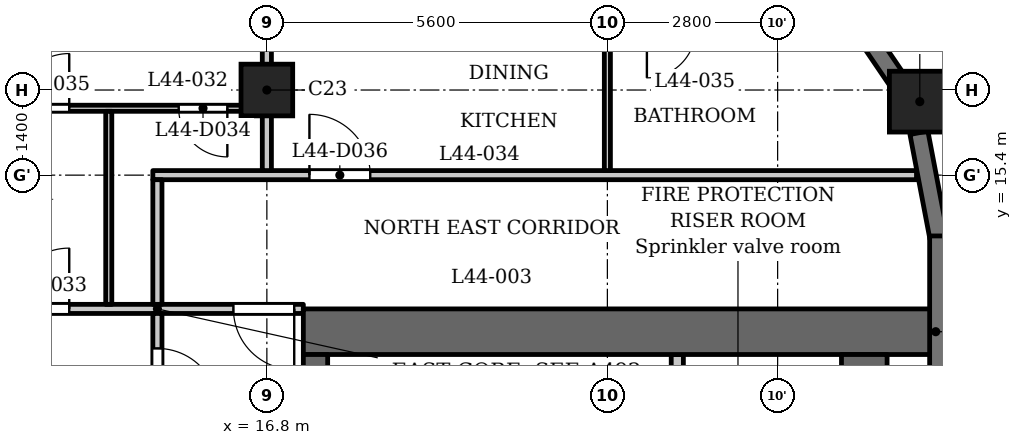
"""IFC4 building model, lengths in metres.
Left out: names, types, materials, properties, quantities, classifications, styles, units other than length and angle.
Written with IfcOpenShell. Run it as: python <this file> out.ifc"""

import sys

from ifc_helpers import new_model, si_unit, direction, frame, frame_2d, origin, origin_2d, place, context, subcontext, project, spatial, rectangle, extrude, element, fill, save


model = new_model("IFC4")
c1 = context("Model", 3, precision=1e-05, world=origin(), true_north=direction((0.0, 1.0)))
c2 = subcontext(c1, "Body", "Model", "MODEL_VIEW")
j1 = project(units=[si_unit("LENGTHUNIT", "METRE"), si_unit("PLANEANGLEUNIT", "RADIAN")], contexts=[c1])
p1 = place(None, origin())
s1 = spatial("IfcSite", under=j1, at=p1, CompositionType="ELEMENT")
p2 = place(p1, origin())
s2 = spatial("IfcBuilding", under=s1, at=p2, CompositionType="ELEMENT")
p3 = place(p2, frame((0.0, 0.0, 171.1)))
s3 = spatial("IfcBuildingStorey", under=s2, at=p3, CompositionType="ELEMENT", Elevation=171.1)
p4 = place(p3, frame((27.538, 16.609, 0.0), z_axis=(0.0, 0.0, 1.0), x_axis=(1.0, 0.0, 0.0)))
e1 = element("IfcColumn", 1, at=p4, inside=s3, PredefinedType="COLUMN", context=c2, shape_type="SweptSolid", body=[
    extrude(rectangle(XDim=1.0, YDim=1.0, at=origin_2d()), origin(), (0.0, 0.0, 1.0), 3.5),
])
p5 = place(p3, frame((16.8, 16.8, 0.0), z_axis=(0.0, 0.0, 1.0), x_axis=(1.0, 0.0, 0.0)))
e2 = element("IfcColumn", 2, at=p5, inside=s3, PredefinedType="COLUMN", context=c2, shape_type="SweptSolid", body=[
    extrude(rectangle(XDim=0.85, YDim=0.85, at=origin_2d()), origin(), (0.0, 0.0, 1.0), 3.5),
])
p6 = place(p3, frame((27.85, 11.7, 0.0), z_axis=(0.0, 0.0, 1.0), x_axis=(0.0, 1.0, 0.0)))
e3 = element("IfcWall", 3, at=p6, inside=s3, PredefinedType="SOLIDWALL", context=c2, shape_type="SweptSolid", body=[
    extrude(rectangle(XDim=2.7, YDim=0.3, at=frame_2d((1.35, 0.0))), origin(), (0.0, 0.0, 1.0), 2.45),
])
for number, where, z_axis, x_axis in (
    (4, (27.853, 14.372, 0.0), (0.0, 0.0, 1.0), (-0.187, 0.982, 0.0)),
    (5, (27.166, 16.96, 0.0), (0.0, 0.0, 1.0), (-0.562, 0.827, 0.0)),
):
    element("IfcWall", number, at=place(p3, frame(where, z_axis=z_axis, x_axis=x_axis)), inside=s3, PredefinedType="SOLIDWALL", context=c2, shape_type="SweptSolid", body=[
        extrude(rectangle(XDim=1.756, YDim=0.3, at=frame_2d((0.878, 0.0))), origin(), (0.0, 0.0, 1.0), 2.45),
    ])
p7 = place(p3, frame((17.4, 12.825, 0.0), z_axis=(0.0, 0.0, 1.0), x_axis=(1.0, 0.0, 0.0)))
e6 = element("IfcWall", 6, at=p7, inside=s3, PredefinedType="SHEAR", context=c2, shape_type="SweptSolid", body=[
    extrude(rectangle(XDim=10.4, YDim=0.75, at=frame_2d((5.2, 0.0))), origin(), (0.0, 0.0, 1.0), 3.2),
])
p8 = place(p3, frame((17.6, -12.45, 0.0), z_axis=(0.0, 0.0, 1.0), x_axis=(0.0, 1.0, 0.0)))
e7 = element("IfcWall", 7, at=p8, inside=s3, PredefinedType="SHEAR", context=c2, shape_type="SweptSolid", body=[
    extrude(rectangle(XDim=24.9, YDim=0.4, at=frame_2d((12.45, 0.0))), origin(), (0.0, 0.0, 1.0), 3.2),
])
p9 = place(p8, frame((8.65, 0.0, 0.0)))
e8 = element("IfcOpeningElement", 8, at=p9, cuts=e7, PredefinedType="OPENING", context=c2, shape_type="SweptSolid", body=[
    extrude(rectangle(XDim=0.9, YDim=2.1, at=frame_2d((0.45, 1.05))), frame((0.0, 0.21, 0.0), z_axis=(0.0, -1.0, 0.0), x_axis=(1.0, 0.0, 0.0)), (0.0, 0.0, 1.0), 0.42),
])
p10 = place(p8, frame((15.6, 0.0, 0.0)))
e9 = element("IfcOpeningElement", 9, at=p10, cuts=e7, PredefinedType="OPENING", context=c2, shape_type="SweptSolid", body=[
    extrude(rectangle(XDim=1.1, YDim=2.1, at=frame_2d((0.55, 1.05))), frame((0.0, 0.21, 0.0), z_axis=(0.0, -1.0, 0.0), x_axis=(1.0, 0.0, 0.0)), (0.0, 0.0, 1.0), 0.42),
])
p11 = place(p8, frame((18.0, 0.0, 0.0)))
e10 = element("IfcOpeningElement", 10, at=p11, cuts=e7, PredefinedType="OPENING", context=c2, shape_type="SweptSolid", body=[
    extrude(rectangle(XDim=1.1, YDim=2.1, at=frame_2d((0.55, 1.05))), frame((0.0, 0.21, 0.0), z_axis=(0.0, -1.0, 0.0), x_axis=(1.0, 0.0, 0.0)), (0.0, 0.0, 1.0), 0.42),
])
p12 = place(p8, frame((23.025, 0.0, 0.0)))
e11 = element("IfcOpeningElement", 11, at=p12, cuts=e7, PredefinedType="OPENING", context=c2, shape_type="SweptSolid", body=[
    extrude(rectangle(XDim=1.1, YDim=2.1, at=frame_2d((0.55, 1.05))), frame((0.0, 0.21, 0.0), z_axis=(0.0, -1.0, 0.0), x_axis=(1.0, 0.0, 0.0)), (0.0, 0.0, 1.0), 0.42),
])
p13 = place(p8, frame((0.775, 0.0, 0.0)))
e12 = element("IfcOpeningElement", 12, at=p13, cuts=e7, PredefinedType="OPENING", context=c2, shape_type="SweptSolid", body=[
    extrude(rectangle(XDim=1.1, YDim=2.1, at=frame_2d((0.55, 1.05))), frame((0.0, 0.21, 0.0), z_axis=(0.0, -1.0, 0.0), x_axis=(1.0, 0.0, 0.0)), (0.0, 0.0, 1.0), 0.42),
])
p14 = place(p8, frame((12.925, 0.0, 0.0)))
e13 = element("IfcOpeningElement", 13, at=p14, cuts=e7, PredefinedType="OPENING", context=c2, shape_type="SweptSolid", body=[
    extrude(rectangle(XDim=1.8, YDim=2.1, at=frame_2d((0.9, 1.05))), frame((0.0, 0.21, 0.0), z_axis=(0.0, -1.0, 0.0), x_axis=(1.0, 0.0, 0.0)), (0.0, 0.0, 1.0), 0.42),
])
p15 = place(p3, frame((26.625, -12.45, 0.0), z_axis=(0.0, 0.0, 1.0), x_axis=(0.0, 1.0, 0.0)))
e14 = element("IfcWall", 14, at=p15, inside=s3, PredefinedType="SHEAR", context=c2, shape_type="SweptSolid", body=[
    extrude(rectangle(XDim=24.9, YDim=0.75, at=frame_2d((12.45, 0.0))), origin(), (0.0, 0.0, 1.0), 3.2),
])
p16 = place(p3, frame((23.55, 9.8, 0.0), z_axis=(0.0, 0.0, 1.0), x_axis=(0.0, 1.0, 0.0)))
e15 = element("IfcWall", 15, at=p16, inside=s3, PredefinedType="PARTITIONING", context=c2, shape_type="SweptSolid", body=[
    extrude(rectangle(XDim=2.65, YDim=0.2, at=frame_2d((1.325, 0.0))), origin(), (0.0, 0.0, 1.0), 3.2),
])
p17 = place(p16, frame((0.875, 0.0, 0.0)))
e16 = element("IfcOpeningElement", 16, at=p17, cuts=e15, PredefinedType="OPENING", context=c2, shape_type="SweptSolid", body=[
    extrude(rectangle(XDim=0.9, YDim=2.1, at=frame_2d((0.45, 1.05))), frame((0.0, 0.11, 0.0), z_axis=(0.0, -1.0, 0.0), x_axis=(1.0, 0.0, 0.0)), (0.0, 0.0, 1.0), 0.22),
])
p18 = place(p3, frame((-17.4, 13.2, 0.0), z_axis=(0.0, 0.0, 1.0), x_axis=(1.0, 0.0, 0.0)))
e17 = element("IfcWall", 17, at=p18, inside=s3, PredefinedType="PARTITIONING", context=c2, shape_type="SweptSolid", body=[
    extrude(rectangle(XDim=34.8, YDim=0.15, at=frame_2d((17.4, 0.0))), origin(), (0.0, 0.0, 1.0), 3.2),
])
p19 = place(p18, frame((0.25, 0.0, 0.0)))
e18 = element("IfcOpeningElement", 18, at=p19, cuts=e17, PredefinedType="OPENING", context=c2, shape_type="SweptSolid", body=[
    extrude(rectangle(XDim=1.0, YDim=2.1, at=frame_2d((0.5, 1.05))), frame((0.0, 0.085, 0.0), z_axis=(0.0, -1.0, 0.0), x_axis=(1.0, 0.0, 0.0)), (0.0, 0.0, 1.0), 0.17),
])
p20 = place(p18, frame((33.65, 0.0, 0.0)))
e19 = element("IfcOpeningElement", 19, at=p20, cuts=e17, PredefinedType="OPENING", context=c2, shape_type="SweptSolid", body=[
    extrude(rectangle(XDim=1.0, YDim=2.1, at=frame_2d((0.5, 1.05))), frame((0.0, 0.085, 0.0), z_axis=(0.0, -1.0, 0.0), x_axis=(1.0, 0.0, 0.0)), (0.0, 0.0, 1.0), 0.17),
])
p21 = place(p18, frame((10.15, 0.0, 0.0)))
e20 = element("IfcOpeningElement", 20, at=p21, cuts=e17, PredefinedType="OPENING", context=c2, shape_type="SweptSolid", body=[
    extrude(rectangle(XDim=1.0, YDim=2.1, at=frame_2d((0.5, 1.05))), frame((0.0, 0.085, 0.0), z_axis=(0.0, -1.0, 0.0), x_axis=(1.0, 0.0, 0.0)), (0.0, 0.0, 1.0), 0.17),
])
p22 = place(p18, frame((15.75, 0.0, 0.0)))
e21 = element("IfcOpeningElement", 21, at=p22, cuts=e17, PredefinedType="OPENING", context=c2, shape_type="SweptSolid", body=[
    extrude(rectangle(XDim=1.0, YDim=2.1, at=frame_2d((0.5, 1.05))), frame((0.0, 0.085, 0.0), z_axis=(0.0, -1.0, 0.0), x_axis=(1.0, 0.0, 0.0)), (0.0, 0.0, 1.0), 0.17),
])
p23 = place(p18, frame((24.95, 0.0, 0.0)))
e22 = element("IfcOpeningElement", 22, at=p23, cuts=e17, PredefinedType="OPENING", context=c2, shape_type="SweptSolid", body=[
    extrude(rectangle(XDim=1.0, YDim=2.1, at=frame_2d((0.5, 1.05))), frame((0.0, 0.085, 0.0), z_axis=(0.0, -1.0, 0.0), x_axis=(1.0, 0.0, 0.0)), (0.0, 0.0, 1.0), 0.17),
])
p24 = place(p18, frame((29.95, 0.0, 0.0)))
e23 = element("IfcOpeningElement", 23, at=p24, cuts=e17, PredefinedType="OPENING", context=c2, shape_type="SweptSolid", body=[
    extrude(rectangle(XDim=1.0, YDim=2.1, at=frame_2d((0.5, 1.05))), frame((0.0, 0.085, 0.0), z_axis=(0.0, -1.0, 0.0), x_axis=(1.0, 0.0, 0.0)), (0.0, 0.0, 1.0), 0.17),
])
p25 = place(p3, frame((14.925, 15.4, 0.0), z_axis=(0.0, 0.0, 1.0), x_axis=(1.0, 0.0, 0.0)))
e24 = element("IfcWall", 24, at=p25, inside=s3, PredefinedType="PARTITIONING", context=c2, shape_type="SweptSolid", body=[
    extrude(rectangle(XDim=12.559, YDim=0.15, at=frame_2d((6.279, 0.0))), origin(), (0.0, 0.0, 1.0), 3.2),
])
p26 = place(p25, frame((2.575, 0.0, 0.0)))
e25 = element("IfcOpeningElement", 25, at=p26, cuts=e24, PredefinedType="OPENING", context=c2, shape_type="SweptSolid", body=[
    extrude(rectangle(XDim=1.0, YDim=2.1, at=frame_2d((0.5, 1.05))), frame((0.0, 0.085, 0.0), z_axis=(0.0, -1.0, 0.0), x_axis=(1.0, 0.0, 0.0)), (0.0, 0.0, 1.0), 0.17),
])
p27 = place(p3, frame((-16.725, 16.5, 0.0), z_axis=(0.0, 0.0, 1.0), x_axis=(1.0, 0.0, 0.0)))
e26 = element("IfcWall", 26, at=p27, inside=s3, PredefinedType="PARTITIONING", context=c2, shape_type="SweptSolid", body=[
    extrude(rectangle(XDim=33.45, YDim=0.1, at=frame_2d((16.725, 0.0))), origin(), (0.0, 0.0, 1.0), 3.2),
])
p28 = place(p27, frame((0.575, 0.0, 0.0)))
e27 = element("IfcOpeningElement", 27, at=p28, cuts=e26, PredefinedType="OPENING", context=c2, shape_type="SweptSolid", body=[
    extrude(rectangle(XDim=0.8, YDim=2.1, at=frame_2d((0.4, 1.05))), frame((0.0, 0.06, 0.0), z_axis=(0.0, -1.0, 0.0), x_axis=(1.0, 0.0, 0.0)), (0.0, 0.0, 1.0), 0.12),
])
p29 = place(p27, frame((3.225, 0.0, 0.0)))
e28 = element("IfcOpeningElement", 28, at=p29, cuts=e26, PredefinedType="OPENING", context=c2, shape_type="SweptSolid", body=[
    extrude(rectangle(XDim=0.9, YDim=2.1, at=frame_2d((0.45, 1.05))), frame((0.0, 0.06, 0.0), z_axis=(0.0, -1.0, 0.0), x_axis=(1.0, 0.0, 0.0)), (0.0, 0.0, 1.0), 0.12),
])
p30 = place(p27, frame((6.775, 0.0, 0.0)))
e29 = element("IfcOpeningElement", 29, at=p30, cuts=e26, PredefinedType="OPENING", context=c2, shape_type="SweptSolid", body=[
    extrude(rectangle(XDim=0.9, YDim=2.1, at=frame_2d((0.45, 1.05))), frame((0.0, 0.06, 0.0), z_axis=(0.0, -1.0, 0.0), x_axis=(1.0, 0.0, 0.0)), (0.0, 0.0, 1.0), 0.12),
])
p31 = place(p27, frame((8.825, 0.0, 0.0)))
e30 = element("IfcOpeningElement", 30, at=p31, cuts=e26, PredefinedType="OPENING", context=c2, shape_type="SweptSolid", body=[
    extrude(rectangle(XDim=0.9, YDim=2.1, at=frame_2d((0.45, 1.05))), frame((0.0, 0.06, 0.0), z_axis=(0.0, -1.0, 0.0), x_axis=(1.0, 0.0, 0.0)), (0.0, 0.0, 1.0), 0.12),
])
p32 = place(p27, frame((20.775, 0.0, 0.0)))
e31 = element("IfcOpeningElement", 31, at=p32, cuts=e26, PredefinedType="OPENING", context=c2, shape_type="SweptSolid", body=[
    extrude(rectangle(XDim=0.8, YDim=2.1, at=frame_2d((0.4, 1.05))), frame((0.0, 0.06, 0.0), z_axis=(0.0, -1.0, 0.0), x_axis=(1.0, 0.0, 0.0)), (0.0, 0.0, 1.0), 0.12),
])
p33 = place(p27, frame((17.325, 0.0, 0.0)))
e32 = element("IfcOpeningElement", 32, at=p33, cuts=e26, PredefinedType="OPENING", context=c2, shape_type="SweptSolid", body=[
    extrude(rectangle(XDim=0.9, YDim=2.1, at=frame_2d((0.45, 1.05))), frame((0.0, 0.06, 0.0), z_axis=(0.0, -1.0, 0.0), x_axis=(1.0, 0.0, 0.0)), (0.0, 0.0, 1.0), 0.12),
])
p34 = place(p27, frame((12.375, 0.0, 0.0)))
e33 = element("IfcOpeningElement", 33, at=p34, cuts=e26, PredefinedType="OPENING", context=c2, shape_type="SweptSolid", body=[
    extrude(rectangle(XDim=0.9, YDim=2.1, at=frame_2d((0.45, 1.05))), frame((0.0, 0.06, 0.0), z_axis=(0.0, -1.0, 0.0), x_axis=(1.0, 0.0, 0.0)), (0.0, 0.0, 1.0), 0.12),
])
p35 = place(p27, frame((14.425, 0.0, 0.0)))
e34 = element("IfcOpeningElement", 34, at=p35, cuts=e26, PredefinedType="OPENING", context=c2, shape_type="SweptSolid", body=[
    extrude(rectangle(XDim=0.9, YDim=2.1, at=frame_2d((0.45, 1.05))), frame((0.0, 0.06, 0.0), z_axis=(0.0, -1.0, 0.0), x_axis=(1.0, 0.0, 0.0)), (0.0, 0.0, 1.0), 0.12),
])
p36 = place(p27, frame((26.575, 0.0, 0.0)))
e35 = element("IfcOpeningElement", 35, at=p36, cuts=e26, PredefinedType="OPENING", context=c2, shape_type="SweptSolid", body=[
    extrude(rectangle(XDim=0.8, YDim=2.1, at=frame_2d((0.4, 1.05))), frame((0.0, 0.06, 0.0), z_axis=(0.0, -1.0, 0.0), x_axis=(1.0, 0.0, 0.0)), (0.0, 0.0, 1.0), 0.12),
])
p37 = place(p27, frame((23.775, 0.0, 0.0)))
e36 = element("IfcOpeningElement", 36, at=p37, cuts=e26, PredefinedType="OPENING", context=c2, shape_type="SweptSolid", body=[
    extrude(rectangle(XDim=0.9, YDim=2.1, at=frame_2d((0.45, 1.05))), frame((0.0, 0.06, 0.0), z_axis=(0.0, -1.0, 0.0), x_axis=(1.0, 0.0, 0.0)), (0.0, 0.0, 1.0), 0.12),
])
p38 = place(p27, frame((32.075, 0.0, 0.0)))
e37 = element("IfcOpeningElement", 37, at=p38, cuts=e26, PredefinedType="OPENING", context=c2, shape_type="SweptSolid", body=[
    extrude(rectangle(XDim=0.8, YDim=2.1, at=frame_2d((0.4, 1.05))), frame((0.0, 0.06, 0.0), z_axis=(0.0, -1.0, 0.0), x_axis=(1.0, 0.0, 0.0)), (0.0, 0.0, 1.0), 0.12),
])
p39 = place(p27, frame((29.375, 0.0, 0.0)))
e38 = element("IfcOpeningElement", 38, at=p39, cuts=e26, PredefinedType="OPENING", context=c2, shape_type="SweptSolid", body=[
    extrude(rectangle(XDim=0.9, YDim=2.1, at=frame_2d((0.45, 1.05))), frame((0.0, 0.06, 0.0), z_axis=(0.0, -1.0, 0.0), x_axis=(1.0, 0.0, 0.0)), (0.0, 0.0, 1.0), 0.12),
])
p40 = place(p3, frame((14.2, 13.275, 0.0), z_axis=(0.0, 0.0, 1.0), x_axis=(0.0, 1.0, 0.0)))
e39 = element("IfcWall", 39, at=p40, inside=s3, PredefinedType="PARTITIONING", context=c2, shape_type="SweptSolid", body=[
    extrude(rectangle(XDim=3.175, YDim=0.1, at=frame_2d((1.587, 0.0))), origin(), (0.0, 0.0, 1.0), 3.2),
])
p41 = place(p3, frame((15.0, 6.769, 0.0), z_axis=(0.0, 0.0, 1.0), x_axis=(0.0, 1.0, 0.0)))
e40 = element("IfcWall", 40, at=p41, inside=s3, PredefinedType="PARTITIONING", context=c2, shape_type="SweptSolid", body=[
    extrude(rectangle(XDim=6.356, YDim=0.15, at=frame_2d((3.178, 0.0))), origin(), (0.0, 0.0, 1.0), 3.2),
])
p42 = place(p41, frame((4.781, 0.0, 0.0)))
e41 = element("IfcOpeningElement", 41, at=p42, cuts=e40, PredefinedType="OPENING", context=c2, shape_type="SweptSolid", body=[
    extrude(rectangle(XDim=1.0, YDim=2.1, at=frame_2d((0.5, 1.05))), frame((0.0, 0.085, 0.0), z_axis=(0.0, -1.0, 0.0), x_axis=(1.0, 0.0, 0.0)), (0.0, 0.0, 1.0), 0.17),
])
p43 = place(p3, frame((15.0, 13.275, 0.0), z_axis=(0.0, 0.0, 1.0), x_axis=(0.0, 1.0, 0.0)))
e42 = element("IfcWall", 42, at=p43, inside=s3, PredefinedType="PARTITIONING", context=c2, shape_type="SweptSolid", body=[
    extrude(rectangle(XDim=2.05, YDim=0.15, at=frame_2d((1.025, 0.0))), origin(), (0.0, 0.0, 1.0), 3.2),
])
p44 = place(p3, frame((16.8, 15.475, 0.0), z_axis=(0.0, 0.0, 1.0), x_axis=(0.0, 1.0, 0.0)))
e43 = element("IfcWall", 43, at=p44, inside=s3, PredefinedType="PARTITIONING", context=c2, shape_type="SweptSolid", body=[
    extrude(rectangle(XDim=7.405, YDim=0.15, at=frame_2d((3.702, 0.0))), origin(), (0.0, 0.0, 1.0), 3.2),
])
p45 = place(p3, frame((22.4, 15.475, 0.0), z_axis=(0.0, 0.0, 1.0), x_axis=(0.0, 1.0, 0.0)))
e44 = element("IfcWall", 44, at=p45, inside=s3, PredefinedType="PARTITIONING", context=c2, shape_type="SweptSolid", body=[
    extrude(rectangle(XDim=2.275, YDim=0.1, at=frame_2d((1.137, 0.0))), origin(), (0.0, 0.0, 1.0), 3.2),
])
p46 = place(p42, origin())
e45 = element("IfcDoor", 45, at=p46, inside=s3, OperationType="SINGLE_SWING_LEFT", PredefinedType="DOOR", context=c2, shape_type="SweptSolid", body=[
    extrude(rectangle(XDim=1.0, YDim=2.1, at=frame_2d((0.5, 1.05))), frame((0.0, 0.025, 0.0), z_axis=(0.0, -1.0, 0.0), x_axis=(1.0, 0.0, 0.0)), (0.0, 0.0, 1.0), 0.05),
])
fill(e41, e45)
p47 = place(p20, origin())
e46 = element("IfcDoor", 46, at=p47, inside=s3, OperationType="SINGLE_SWING_RIGHT", PredefinedType="DOOR", context=c2, shape_type="SweptSolid", body=[
    extrude(rectangle(XDim=1.0, YDim=2.1, at=frame_2d((0.5, 1.05))), frame((0.0, 0.025, 0.0), z_axis=(0.0, -1.0, 0.0), x_axis=(1.0, 0.0, 0.0)), (0.0, 0.0, 1.0), 0.05),
])
fill(e19, e46)
p48 = place(p24, origin())
e47 = element("IfcDoor", 47, at=p48, inside=s3, OperationType="SINGLE_SWING_LEFT", PredefinedType="DOOR", context=c2, shape_type="SweptSolid", body=[
    extrude(rectangle(XDim=1.0, YDim=2.1, at=frame_2d((0.5, 1.05))), frame((0.0, 0.025, 0.0), z_axis=(0.0, -1.0, 0.0), x_axis=(1.0, 0.0, 0.0)), (0.0, 0.0, 1.0), 0.05),
])
fill(e23, e47)
p49 = place(p38, origin())
e48 = element("IfcDoor", 48, at=p49, inside=s3, OperationType="SINGLE_SWING_RIGHT", PredefinedType="DOOR", context=c2, shape_type="SweptSolid", body=[
    extrude(rectangle(XDim=0.8, YDim=2.1, at=frame_2d((0.4, 1.05))), frame((0.0, 0.025, 0.0), z_axis=(0.0, -1.0, 0.0), x_axis=(1.0, 0.0, 0.0)), (0.0, 0.0, 1.0), 0.05),
])
fill(e37, e48)
p50 = place(p39, origin())
e49 = element("IfcDoor", 49, at=p50, inside=s3, OperationType="SINGLE_SWING_LEFT", PredefinedType="DOOR", context=c2, shape_type="SweptSolid", body=[
    extrude(rectangle(XDim=0.9, YDim=2.1, at=frame_2d((0.45, 1.05))), frame((0.0, 0.025, 0.0), z_axis=(0.0, -1.0, 0.0), x_axis=(1.0, 0.0, 0.0)), (0.0, 0.0, 1.0), 0.05),
])
fill(e38, e49)
p51 = place(p26, origin())
e50 = element("IfcDoor", 50, at=p51, inside=s3, OperationType="SINGLE_SWING_RIGHT", PredefinedType="DOOR", context=c2, shape_type="SweptSolid", body=[
    extrude(rectangle(XDim=1.0, YDim=2.1, at=frame_2d((0.5, 1.05))), frame((0.0, 0.025, 0.0), z_axis=(0.0, -1.0, 0.0), x_axis=(1.0, 0.0, 0.0)), (0.0, 0.0, 1.0), 0.05),
])
fill(e25, e50)
save(model, sys.argv[1])
